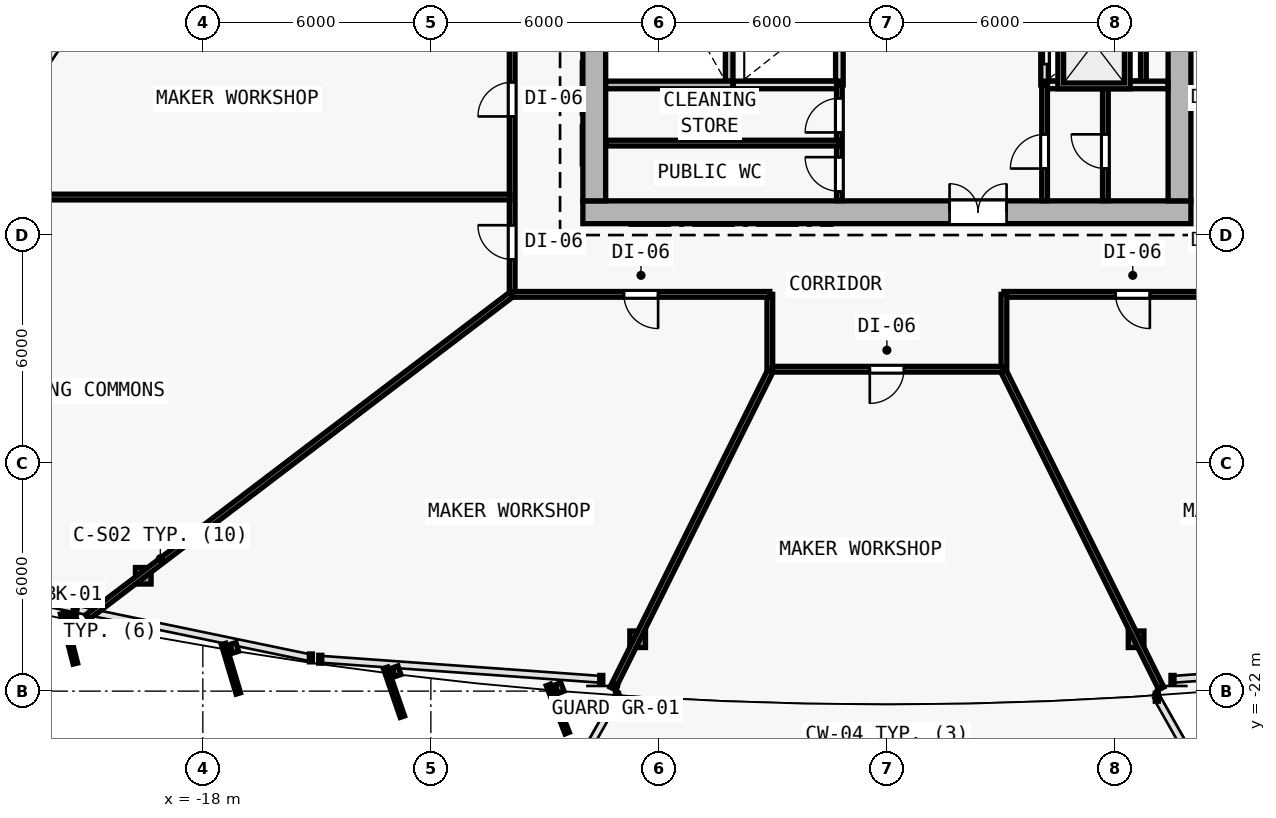
"""IFC4 building model, lengths in metres.
Left out: names, types, materials, properties, quantities, classifications, styles, units other than length and angle.
Written with IfcOpenShell. Run it as: python <this file> out.ifc"""

import sys

from ifc_helpers import new_model, si_unit, direction, frame, frame_2d, origin, origin_2d, place, context, subcontext, project, spatial, rectangle, i_section, extrude, element, fill, save


model = new_model("IFC4")
c1 = context("Model", 3, precision=1e-05, world=origin(), true_north=direction((0.0, 1.0)))
c2 = subcontext(c1, "Body", "Model", "MODEL_VIEW")
j1 = project(units=[si_unit("LENGTHUNIT", "METRE"), si_unit("PLANEANGLEUNIT", "RADIAN")], contexts=[c1])
p1 = place(None, origin())
s1 = spatial("IfcSite", under=j1, at=p1, CompositionType="ELEMENT")
p2 = place(p1, origin())
s2 = spatial("IfcBuilding", under=s1, at=p2, CompositionType="ELEMENT")
p3 = place(p2, frame((0.0, 0.0, 66.0)))
s3 = spatial("IfcBuildingStorey", under=s2, at=p3, CompositionType="ELEMENT", Elevation=66.0)
for number, where, z_axis, x_axis in (
    (1, (-7.7, -9.4, 0.0), (0.0, 0.0, 1.0), (1.0, 0.0, 0.0)),
    (2, (7.7, -9.4, 0.0), (0.0, 0.0, 1.0), (1.0, 0.0, 0.0)),
    (3, (0.0, -9.4, 0.0), (0.0, 0.0, 1.0), (1.0, 0.0, 0.0)),
):
    element("IfcColumn", number, at=place(p3, frame(where, z_axis=z_axis, x_axis=x_axis)), inside=s3, PredefinedType="COLUMN", context=c2, shape_type="SweptSolid", body=[
        extrude(i_section(OverallWidth=0.416, OverallDepth=0.446, WebThickness=0.025, FlangeThickness=0.04, FilletRadius=0.015, at=origin_2d()), origin(), (0.0, 0.0, 1.0), 3.6),
    ])
p4 = place(p3, frame((-19.568, -18.965, 0.006), z_axis=(0.020596292833, 0.033511459955, 0.999226087917), x_axis=(-0.851954850327, 0.523615252838, 0.0)))
e4 = element("IfcColumn", 4, at=p4, inside=s3, PredefinedType="COLUMN", context=c2, shape_type="SweptSolid", body=[
    extrude(i_section(OverallWidth=0.412, OverallDepth=0.435, WebThickness=0.023, FlangeThickness=0.037, FilletRadius=0.015, at=origin_2d()), origin(), (0.0, 0.0, 1.0), 3.592),
])
for number, where, z_axis, x_axis in (
    (5, (-6.558, -20.635, 0.006), (0.007, 0.035, 0.999), (-0.981, 0.193, 0.0)),
    (6, (6.558, -20.635, 0.006), (-0.007, 0.035, 0.999), (-0.981, -0.193, 0.0)),
):
    element("IfcColumn", number, at=place(p3, frame(where, z_axis=z_axis, x_axis=x_axis)), inside=s3, PredefinedType="COLUMN", context=c2, shape_type="SweptSolid", body=[
        extrude(i_section(OverallWidth=0.412, OverallDepth=0.435, WebThickness=0.023, FlangeThickness=0.037, FilletRadius=0.015, at=origin_2d()), origin(), (0.0, 0.0, 1.0), 3.591),
    ])
p5 = place(p3, frame((-8.0, -9.4, 0.0), z_axis=(0.0, 0.0, 1.0), x_axis=(1.0, 0.0, 0.0)))
e7 = element("IfcWall", 7, at=p5, inside=s3, PredefinedType="SHEAR", context=c2, shape_type="SweptSolid", body=[
    extrude(rectangle(XDim=16.0, YDim=0.6, at=frame_2d((8.0, 0.0))), origin(), (0.0, 0.0, 1.0), 3.35),
])
p6 = place(p5, frame((9.65, 0.0, 0.0)))
e8 = element("IfcOpeningElement", 8, at=p6, cuts=e7, PredefinedType="OPENING", context=c2, shape_type="SweptSolid", body=[
    extrude(rectangle(XDim=1.5, YDim=2.2, at=frame_2d((0.75, 1.1))), frame((0.0, 0.31, 0.0), z_axis=(0.0, -1.0, 0.0), x_axis=(1.0, 0.0, 0.0)), (0.0, 0.0, 1.0), 0.62),
])
p7 = place(p3, frame((-7.7, -9.1, 0.0), z_axis=(0.0, 0.0, 1.0), x_axis=(0.0, 1.0, 0.0)))
e9 = element("IfcWall", 9, at=p7, inside=s3, PredefinedType="SHEAR", context=c2, shape_type="SweptSolid", body=[
    extrude(rectangle(XDim=19.0, YDim=0.6, at=frame_2d((9.5, 0.0))), origin(), (0.0, 0.0, 1.0), 3.35),
])
p8 = place(p7, frame((12.65, 0.0, 0.0)))
e10 = element("IfcOpeningElement", 10, at=p8, cuts=e9, PredefinedType="OPENING", context=c2, shape_type="SweptSolid", body=[
    extrude(rectangle(XDim=1.1, YDim=2.15, at=frame_2d((0.55, 1.075))), frame((0.0, 0.31, 0.0), z_axis=(0.0, -1.0, 0.0), x_axis=(1.0, 0.0, 0.0)), (0.0, 0.0, 1.0), 0.62),
])
p9 = place(p3, frame((7.7, 9.9, 0.0), z_axis=(0.0, 0.0, 1.0), x_axis=(0.0, -1.0, 0.0)))
e11 = element("IfcWall", 11, at=p9, inside=s3, PredefinedType="SHEAR", context=c2, shape_type="SweptSolid", body=[
    extrude(rectangle(XDim=19.0, YDim=0.6, at=frame_2d((9.5, 0.0))), origin(), (0.0, 0.0, 1.0), 3.35),
])
p10 = place(p3, frame((-4.15, -5.95, 0.0), z_axis=(0.0, 0.0, 1.0), x_axis=(0.0, 1.0, 0.0)))
e12 = element("IfcWall", 12, at=p10, inside=s3, PredefinedType="SOLIDWALL", context=c2, shape_type="SweptSolid", body=[
    extrude(rectangle(XDim=7.2, YDim=0.2, at=frame_2d((3.6, 0.0))), origin(), (0.0, 0.0, 1.0), 3.35),
])
p11 = place(p3, frame((4.15, -6.05, 0.0), z_axis=(0.0, 0.0, 1.0), x_axis=(0.0, 1.0, 0.0)))
e13 = element("IfcWall", 13, at=p11, inside=s3, PredefinedType="SOLIDWALL", context=c2, shape_type="SweptSolid", body=[
    extrude(rectangle(XDim=8.7, YDim=0.2, at=frame_2d((4.35, 0.0))), origin(), (0.0, 0.0, 1.0), 3.35),
])
p12 = place(p11, frame((0.55, 0.0, 0.0)))
e14 = element("IfcOpeningElement", 14, at=p12, cuts=e13, PredefinedType="OPENING", context=c2, shape_type="SweptSolid", body=[
    extrude(rectangle(XDim=1.1, YDim=2.15, at=frame_2d((0.55, 1.075))), frame((0.0, 0.11, 0.0), z_axis=(0.0, -1.0, 0.0), x_axis=(1.0, 0.0, 0.0)), (0.0, 0.0, 1.0), 0.22),
])
p13 = place(p11, frame((2.65, 0.0, 0.0)))
e15 = element("IfcOpeningElement", 15, at=p13, cuts=e13, PredefinedType="OPENING", context=c2, shape_type="SweptSolid", body=[
    extrude(rectangle(XDim=1.1, YDim=2.15, at=frame_2d((0.55, 1.075))), frame((0.0, 0.11, 0.0), z_axis=(0.0, -1.0, 0.0), x_axis=(1.0, 0.0, 0.0)), (0.0, 0.0, 1.0), 0.22),
])
p14 = place(p11, frame((4.75, 0.0, 0.0)))
e16 = element("IfcOpeningElement", 16, at=p14, cuts=e13, PredefinedType="OPENING", context=c2, shape_type="SweptSolid", body=[
    extrude(rectangle(XDim=1.1, YDim=2.15, at=frame_2d((0.55, 1.075))), frame((0.0, 0.11, 0.0), z_axis=(0.0, -1.0, 0.0), x_axis=(1.0, 0.0, 0.0)), (0.0, 0.0, 1.0), 0.22),
])
p15 = place(p11, frame((6.85, 0.0, 0.0)))
e17 = element("IfcOpeningElement", 17, at=p15, cuts=e13, PredefinedType="OPENING", context=c2, shape_type="SweptSolid", body=[
    extrude(rectangle(XDim=1.1, YDim=2.15, at=frame_2d((0.55, 1.075))), frame((0.0, 0.11, 0.0), z_axis=(0.0, -1.0, 0.0), x_axis=(1.0, 0.0, 0.0)), (0.0, 0.0, 1.0), 0.22),
])
p16 = place(p3, frame((6.75, -6.05, 0.0), z_axis=(0.0, 0.0, 1.0), x_axis=(0.0, 1.0, 0.0)))
e18 = element("IfcWall", 18, at=p16, inside=s3, PredefinedType="PARTITIONING", context=c2, shape_type="SweptSolid", body=[
    extrude(rectangle(XDim=8.7, YDim=0.15, at=frame_2d((4.35, 0.0))), origin(), (0.0, 0.0, 1.0), 3.35),
])
p17 = place(p3, frame((-1.25, -6.05, 0.0), z_axis=(0.0, 0.0, 1.0), x_axis=(0.0, 1.0, 0.0)))
e19 = element("IfcWall", 19, at=p17, inside=s3, PredefinedType="SOLIDWALL", context=c2, shape_type="SweptSolid", body=[
    extrude(rectangle(XDim=8.7, YDim=0.2, at=frame_2d((4.35, 0.0))), origin(), (0.0, 0.0, 1.0), 3.35),
])
p18 = place(p3, frame((-7.4, -6.05, 0.0), z_axis=(0.0, 0.0, 1.0), x_axis=(1.0, 0.0, 0.0)))
e20 = element("IfcWall", 20, at=p18, inside=s3, PredefinedType="SOLIDWALL", context=c2, shape_type="SweptSolid", body=[
    extrude(rectangle(XDim=3.35, YDim=0.2, at=frame_2d((1.675, 0.0))), origin(), (0.0, 0.0, 1.0), 3.35),
])
p19 = place(p3, frame((-4.04, -6.05, 0.0), z_axis=(0.0, 0.0, 1.0), x_axis=(1.0, 0.0, 0.0)))
e21 = element("IfcWall", 21, at=p19, inside=s3, PredefinedType="SOLIDWALL", context=c2, shape_type="SweptSolid", body=[
    extrude(rectangle(XDim=2.79, YDim=0.2, at=frame_2d((1.395, 0.0))), origin(), (0.0, 0.0, 1.0), 3.35),
])
p20 = place(p3, frame((4.15, -6.05, 0.0), z_axis=(0.0, 0.0, 1.0), x_axis=(1.0, 0.0, 0.0)))
e22 = element("IfcWall", 22, at=p20, inside=s3, PredefinedType="SOLIDWALL", context=c2, shape_type="SweptSolid", body=[
    extrude(rectangle(XDim=3.245, YDim=0.2, at=frame_2d((1.623, 0.0))), origin(), (0.0, 0.0, 1.0), 3.35),
])
p21 = place(p3, frame((-1.25, -9.095, 0.0), z_axis=(0.0, 0.0, 1.0), x_axis=(0.0, 1.0, 0.0)))
e23 = element("IfcWall", 23, at=p21, inside=s3, PredefinedType="PARTITIONING", context=c2, shape_type="SweptSolid", body=[
    extrude(rectangle(XDim=3.045, YDim=0.15, at=frame_2d((1.522, 0.0))), origin(), (0.0, 0.0, 1.0), 3.35),
])
p22 = place(p21, frame((1.795, 0.0, 0.0)))
e24 = element("IfcOpeningElement", 24, at=p22, cuts=e23, PredefinedType="OPENING", context=c2, shape_type="SweptSolid", body=[
    extrude(rectangle(XDim=0.9, YDim=2.1, at=frame_2d((0.45, 1.05))), frame((0.0, 0.085, 0.0), z_axis=(0.0, -1.0, 0.0), x_axis=(1.0, 0.0, 0.0)), (0.0, 0.0, 1.0), 0.17),
])
p23 = place(p21, frame((0.245, 0.0, 0.0)))
e25 = element("IfcOpeningElement", 25, at=p23, cuts=e23, PredefinedType="OPENING", context=c2, shape_type="SweptSolid", body=[
    extrude(rectangle(XDim=0.9, YDim=2.1, at=frame_2d((0.45, 1.05))), frame((0.0, 0.085, 0.0), z_axis=(0.0, -1.0, 0.0), x_axis=(1.0, 0.0, 0.0)), (0.0, 0.0, 1.0), 0.17),
])
p24 = place(p3, frame((4.15, -9.095, 0.0), z_axis=(0.0, 0.0, 1.0), x_axis=(0.0, 1.0, 0.0)))
e26 = element("IfcWall", 26, at=p24, inside=s3, PredefinedType="PARTITIONING", context=c2, shape_type="SweptSolid", body=[
    extrude(rectangle(XDim=3.045, YDim=0.15, at=frame_2d((1.522, 0.0))), origin(), (0.0, 0.0, 1.0), 3.35),
])
p25 = place(p24, frame((0.845, 0.0, 0.0)))
e27 = element("IfcOpeningElement", 27, at=p25, cuts=e26, PredefinedType="OPENING", context=c2, shape_type="SweptSolid", body=[
    extrude(rectangle(XDim=0.9, YDim=2.1, at=frame_2d((0.45, 1.05))), frame((0.0, 0.085, 0.0), z_axis=(0.0, -1.0, 0.0), x_axis=(1.0, 0.0, 0.0)), (0.0, 0.0, 1.0), 0.17),
])
p26 = place(p3, frame((-7.395, -7.58, 0.0), z_axis=(0.0, 0.0, 1.0), x_axis=(1.0, 0.0, 0.0)))
e28 = element("IfcWall", 28, at=p26, inside=s3, PredefinedType="PARTITIONING", context=c2, shape_type="SweptSolid", body=[
    extrude(rectangle(XDim=6.145, YDim=0.15, at=frame_2d((3.073, 0.0))), origin(), (0.0, 0.0, 1.0), 3.35),
])
p27 = place(p3, frame((5.75, -9.095, 0.0), z_axis=(0.0, 0.0, 1.0), x_axis=(0.0, 1.0, 0.0)))
e29 = element("IfcWall", 29, at=p27, inside=s3, PredefinedType="PARTITIONING", context=c2, shape_type="SweptSolid", body=[
    extrude(rectangle(XDim=3.045, YDim=0.15, at=frame_2d((1.522, 0.0))), origin(), (0.0, 0.0, 1.0), 3.35),
])
p28 = place(p27, frame((0.845, 0.0, 0.0)))
e30 = element("IfcOpeningElement", 30, at=p28, cuts=e29, PredefinedType="OPENING", context=c2, shape_type="SweptSolid", body=[
    extrude(rectangle(XDim=0.9, YDim=2.1, at=frame_2d((0.45, 1.05))), frame((0.0, 0.085, 0.0), z_axis=(0.0, -1.0, 0.0), x_axis=(1.0, 0.0, 0.0)), (0.0, 0.0, 1.0), 0.17),
])
p29 = place(p3, frame((-9.86, -11.56, 0.0), z_axis=(0.0, 0.0, 1.0), x_axis=(0.0, 1.0, 0.0)))
e31 = element("IfcWall", 31, at=p29, inside=s3, PredefinedType="PARTITIONING", context=c2, shape_type="SweptSolid", body=[
    extrude(rectangle(XDim=19.986, YDim=0.15, at=frame_2d((9.993, 0.0))), origin(), (0.0, 0.0, 1.0), 2.609),
])
p30 = place(p29, frame((9.311, 0.0, 0.0)))
e32 = element("IfcOpeningElement", 32, at=p30, cuts=e31, PredefinedType="OPENING", context=c2, shape_type="SweptSolid", body=[
    extrude(rectangle(XDim=0.9, YDim=2.1, at=frame_2d((0.45, 1.05))), frame((0.0, 0.085, 0.0), z_axis=(0.0, -1.0, 0.0), x_axis=(1.0, 0.0, 0.0)), (0.0, 0.0, 1.0), 0.17),
])
p31 = place(p29, frame((4.681, 0.0, 0.0)))
e33 = element("IfcOpeningElement", 33, at=p31, cuts=e31, PredefinedType="OPENING", context=c2, shape_type="SweptSolid", body=[
    extrude(rectangle(XDim=0.9, YDim=2.1, at=frame_2d((0.45, 1.05))), frame((0.0, 0.085, 0.0), z_axis=(0.0, -1.0, 0.0), x_axis=(1.0, 0.0, 0.0)), (0.0, 0.0, 1.0), 0.17),
])
p32 = place(p29, frame((0.919, 0.0, 0.0)))
e34 = element("IfcOpeningElement", 34, at=p32, cuts=e31, PredefinedType="OPENING", context=c2, shape_type="SweptSolid", body=[
    extrude(rectangle(XDim=0.9, YDim=2.1, at=frame_2d((0.45, 1.05))), frame((0.0, 0.085, 0.0), z_axis=(0.0, -1.0, 0.0), x_axis=(1.0, 0.0, 0.0)), (0.0, 0.0, 1.0), 0.17),
])
p33 = place(p29, frame((13.684, 0.0, 0.0)))
e35 = element("IfcOpeningElement", 35, at=p33, cuts=e31, PredefinedType="OPENING", context=c2, shape_type="SweptSolid", body=[
    extrude(rectangle(XDim=0.9, YDim=2.1, at=frame_2d((0.45, 1.05))), frame((0.0, 0.085, 0.0), z_axis=(0.0, -1.0, 0.0), x_axis=(1.0, 0.0, 0.0)), (0.0, 0.0, 1.0), 0.17),
])
p34 = place(p3, frame((9.86, -11.56, 0.0), z_axis=(0.0, 0.0, 1.0), x_axis=(-1.0, 0.0, 0.0)))
e36 = element("IfcWall", 36, at=p34, inside=s3, PredefinedType="PARTITIONING", context=c2, shape_type="SweptSolid", body=[
    extrude(rectangle(XDim=6.78, YDim=0.15, at=frame_2d((3.39, 0.0))), origin(), (0.0, 0.0, 1.0), 3.35),
])
p35 = place(p34, frame((2.94, 0.0, 0.0)))
e37 = element("IfcOpeningElement", 37, at=p35, cuts=e36, PredefinedType="OPENING", context=c2, shape_type="SweptSolid", body=[
    extrude(rectangle(XDim=0.9, YDim=2.1, at=frame_2d((0.45, 1.05))), frame((0.0, 0.085, 0.0), z_axis=(0.0, -1.0, 0.0), x_axis=(1.0, 0.0, 0.0)), (0.0, 0.0, 1.0), 0.17),
])
p36 = place(p3, frame((3.08, -11.56, 0.0), z_axis=(0.0, 0.0, 1.0), x_axis=(0.0, -1.0, 0.0)))
e38 = element("IfcWall", 38, at=p36, inside=s3, PredefinedType="PARTITIONING", context=c2, shape_type="SweptSolid", body=[
    extrude(rectangle(XDim=1.97, YDim=0.15, at=frame_2d((0.985, 0.0))), origin(), (0.0, 0.0, 1.0), 2.925),
])
p37 = place(p3, frame((3.08, -13.53, 0.0), z_axis=(0.0, 0.0, 1.0), x_axis=(-1.0, 0.0, 0.0)))
e39 = element("IfcWall", 39, at=p37, inside=s3, PredefinedType="PARTITIONING", context=c2, shape_type="SweptSolid", body=[
    extrude(rectangle(XDim=6.16, YDim=0.15, at=frame_2d((3.08, 0.0))), origin(), (0.0, 0.0, 1.0), 2.725),
])
p38 = place(p37, frame((2.63, 0.0, 0.0)))
e40 = element("IfcOpeningElement", 40, at=p38, cuts=e39, PredefinedType="OPENING", context=c2, shape_type="SweptSolid", body=[
    extrude(rectangle(XDim=0.9, YDim=2.1, at=frame_2d((0.45, 1.05))), frame((0.0, 0.085, 0.0), z_axis=(0.0, -1.0, 0.0), x_axis=(1.0, 0.0, 0.0)), (0.0, 0.0, 1.0), 0.17),
])
p39 = place(p3, frame((-3.08, -13.53, 0.0), z_axis=(0.0, 0.0, 1.0), x_axis=(0.0, 1.0, 0.0)))
e41 = element("IfcWall", 41, at=p39, inside=s3, PredefinedType="PARTITIONING", context=c2, shape_type="SweptSolid", body=[
    extrude(rectangle(XDim=1.97, YDim=0.15, at=frame_2d((0.985, 0.0))), origin(), (0.0, 0.0, 1.0), 2.775),
])
p40 = place(p3, frame((-3.08, -11.56, 0.0), z_axis=(0.0, 0.0, 1.0), x_axis=(-1.0, 0.0, 0.0)))
e42 = element("IfcWall", 42, at=p40, inside=s3, PredefinedType="PARTITIONING", context=c2, shape_type="SweptSolid", body=[
    extrude(rectangle(XDim=6.78, YDim=0.15, at=frame_2d((3.39, 0.0))), origin(), (0.0, 0.0, 1.0), 3.35),
])
p41 = place(p40, frame((2.94, 0.0, 0.0)))
e43 = element("IfcOpeningElement", 43, at=p41, cuts=e42, PredefinedType="OPENING", context=c2, shape_type="SweptSolid", body=[
    extrude(rectangle(XDim=0.9, YDim=2.1, at=frame_2d((0.45, 1.05))), frame((0.0, 0.085, 0.0), z_axis=(0.0, -1.0, 0.0), x_axis=(1.0, 0.0, 0.0)), (0.0, 0.0, 1.0), 0.17),
])
p42 = place(p3, frame((-9.888, -11.569, 0.0), z_axis=(0.0, 0.0, 1.0), x_axis=(-0.795860269097, -0.605480331698, 0.0)))
e44 = element("IfcWall", 44, at=p42, inside=s3, PredefinedType="PARTITIONING", context=c2, shape_type="SweptSolid", body=[
    extrude(rectangle(XDim=14.013, YDim=0.15, at=frame_2d((7.006, 0.0))), origin(), (0.0, 0.0, 1.0), 2.725),
])
for number, where, z_axis, x_axis in (
    (45, (-3.066, -13.573, 0.0), (0.0, 0.0, 1.0), (-0.445, -0.895, 0.0)),
    (46, (3.066, -13.573, 0.0), (0.0, 0.0, 1.0), (0.445, -0.895, 0.0)),
):
    element("IfcWall", number, at=place(p3, frame(where, z_axis=z_axis, x_axis=x_axis)), inside=s3, PredefinedType="PARTITIONING", context=c2, shape_type="SweptSolid", body=[
        extrude(rectangle(XDim=9.33, YDim=0.15, at=frame_2d((4.665, 0.0))), origin(), (0.0, 0.0, 1.0), 2.725),
    ])
p43 = place(p3, frame((-9.92, -9.0, 0.0), z_axis=(0.0, 0.0, 1.0), x_axis=(-1.0, 0.0, 0.0)))
e47 = element("IfcWall", 47, at=p43, inside=s3, PredefinedType="PARTITIONING", context=c2, shape_type="SweptSolid", body=[
    extrude(rectangle(XDim=14.547, YDim=0.15, at=frame_2d((7.273, 0.0))), origin(), (0.0, 0.0, 1.0), 2.609),
])
p44 = place(p6, origin())
e48 = element("IfcDoor", 48, at=p44, inside=s3, OperationType="DOUBLE_DOOR_SINGLE_SWING", PredefinedType="DOOR", context=c2, shape_type="SweptSolid", body=[
    extrude(rectangle(XDim=1.5, YDim=2.2, at=frame_2d((0.75, 1.1))), frame((0.0, 0.025, 0.0), z_axis=(0.0, -1.0, 0.0), x_axis=(1.0, 0.0, 0.0)), (0.0, 0.0, 1.0), 0.05),
])
fill(e8, e48)
p45 = place(p12, origin())
e49 = element("IfcDoor", 49, at=p45, inside=s3, OperationType="DOUBLE_DOOR_SLIDING", PredefinedType="DOOR", context=c2, shape_type="SweptSolid", body=[
    extrude(rectangle(XDim=1.1, YDim=2.15, at=frame_2d((0.55, 1.075))), frame((0.0, 0.025, 0.0), z_axis=(0.0, -1.0, 0.0), x_axis=(1.0, 0.0, 0.0)), (0.0, 0.0, 1.0), 0.05),
])
fill(e14, e49)
p46 = place(p22, origin())
e50 = element("IfcDoor", 50, at=p46, inside=s3, OperationType="SINGLE_SWING_LEFT", PredefinedType="DOOR", context=c2, shape_type="SweptSolid", body=[
    extrude(rectangle(XDim=0.9, YDim=2.1, at=frame_2d((0.45, 1.05))), frame((0.0, 0.025, 0.0), z_axis=(0.0, -1.0, 0.0), x_axis=(1.0, 0.0, 0.0)), (0.0, 0.0, 1.0), 0.05),
])
fill(e24, e50)
p47 = place(p23, origin())
e51 = element("IfcDoor", 51, at=p47, inside=s3, OperationType="SINGLE_SWING_RIGHT", PredefinedType="DOOR", context=c2, shape_type="SweptSolid", body=[
    extrude(rectangle(XDim=0.9, YDim=2.1, at=frame_2d((0.45, 1.05))), frame((0.0, 0.025, 0.0), z_axis=(0.0, -1.0, 0.0), x_axis=(1.0, 0.0, 0.0)), (0.0, 0.0, 1.0), 0.05),
])
fill(e25, e51)
p48 = place(p25, origin())
e52 = element("IfcDoor", 52, at=p48, inside=s3, OperationType="SINGLE_SWING_LEFT", PredefinedType="DOOR", context=c2, shape_type="SweptSolid", body=[
    extrude(rectangle(XDim=0.9, YDim=2.1, at=frame_2d((0.45, 1.05))), frame((0.0, 0.025, 0.0), z_axis=(0.0, -1.0, 0.0), x_axis=(1.0, 0.0, 0.0)), (0.0, 0.0, 1.0), 0.05),
])
fill(e27, e52)
p49 = place(p28, origin())
e53 = element("IfcDoor", 53, at=p49, inside=s3, OperationType="SINGLE_SWING_RIGHT", PredefinedType="DOOR", context=c2, shape_type="SweptSolid", body=[
    extrude(rectangle(XDim=0.9, YDim=2.1, at=frame_2d((0.45, 1.05))), frame((0.0, 0.025, 0.0), z_axis=(0.0, -1.0, 0.0), x_axis=(1.0, 0.0, 0.0)), (0.0, 0.0, 1.0), 0.05),
])
fill(e30, e53)
p50 = place(p31, origin())
e54 = element("IfcDoor", 54, at=p50, inside=s3, OperationType="SINGLE_SWING_LEFT", PredefinedType="DOOR", context=c2, shape_type="SweptSolid", body=[
    extrude(rectangle(XDim=0.9, YDim=2.1, at=frame_2d((0.45, 1.05))), frame((0.0, 0.025, 0.0), z_axis=(0.0, -1.0, 0.0), x_axis=(1.0, 0.0, 0.0)), (0.0, 0.0, 1.0), 0.05),
])
fill(e33, e54)
p51 = place(p32, origin())
e55 = element("IfcDoor", 55, at=p51, inside=s3, OperationType="SINGLE_SWING_RIGHT", PredefinedType="DOOR", context=c2, shape_type="SweptSolid", body=[
    extrude(rectangle(XDim=0.9, YDim=2.1, at=frame_2d((0.45, 1.05))), frame((0.0, 0.025, 0.0), z_axis=(0.0, -1.0, 0.0), x_axis=(1.0, 0.0, 0.0)), (0.0, 0.0, 1.0), 0.05),
])
fill(e34, e55)
p52 = place(p41, origin())
e56 = element("IfcDoor", 56, at=p52, inside=s3, OperationType="SINGLE_SWING_LEFT", PredefinedType="DOOR", context=c2, shape_type="SweptSolid", body=[
    extrude(rectangle(XDim=0.9, YDim=2.1, at=frame_2d((0.45, 1.05))), frame((0.0, 0.025, 0.0), z_axis=(0.0, -1.0, 0.0), x_axis=(1.0, 0.0, 0.0)), (0.0, 0.0, 1.0), 0.05),
])
fill(e43, e56)
p53 = place(p38, origin())
e57 = element("IfcDoor", 57, at=p53, inside=s3, OperationType="SINGLE_SWING_RIGHT", PredefinedType="DOOR", context=c2, shape_type="SweptSolid", body=[
    extrude(rectangle(XDim=0.9, YDim=2.1, at=frame_2d((0.45, 1.05))), frame((0.0, 0.025, 0.0), z_axis=(0.0, -1.0, 0.0), x_axis=(1.0, 0.0, 0.0)), (0.0, 0.0, 1.0), 0.05),
])
fill(e40, e57)
p54 = place(p35, origin())
e58 = element("IfcDoor", 58, at=p54, inside=s3, OperationType="SINGLE_SWING_LEFT", PredefinedType="DOOR", context=c2, shape_type="SweptSolid", body=[
    extrude(rectangle(XDim=0.9, YDim=2.1, at=frame_2d((0.45, 1.05))), frame((0.0, 0.025, 0.0), z_axis=(0.0, -1.0, 0.0), x_axis=(1.0, 0.0, 0.0)), (0.0, 0.0, 1.0), 0.05),
])
fill(e37, e58)
save(model, sys.argv[1])
